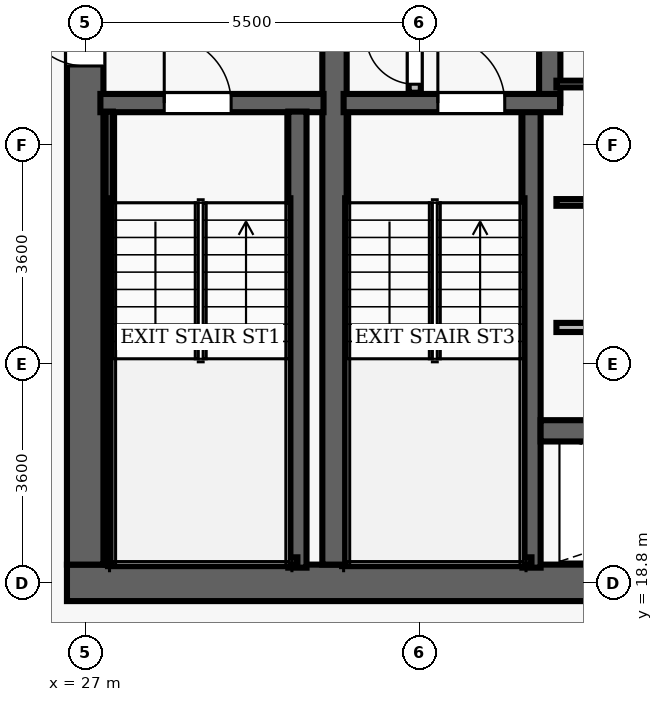
"""IFC4 building model, lengths in metres.
Left out: names, types, materials, properties, quantities, classifications, styles, units other than length and angle.
Written with IfcOpenShell. Run it as: python <this file> out.ifc"""

import sys

from ifc_helpers import new_model, si_unit, direction, frame, frame_2d, origin, place, context, subcontext, project, spatial, rectangle, extrude, element, fill, save


model = new_model("IFC4")
c1 = context("Model", 3, precision=1e-05, world=origin(), true_north=direction((0.0, 1.0)))
c2 = subcontext(c1, "Body", "Model", "MODEL_VIEW")
j1 = project(units=[si_unit("LENGTHUNIT", "METRE"), si_unit("PLANEANGLEUNIT", "RADIAN")], contexts=[c1])
p1 = place(None, origin())
s1 = spatial("IfcSite", under=j1, at=p1, CompositionType="ELEMENT")
p2 = place(p1, origin())
s2 = spatial("IfcBuilding", under=s1, at=p2, CompositionType="ELEMENT")
p3 = place(p2, frame((0.0, 0.0, 44.9)))
s3 = spatial("IfcBuildingStorey", under=s2, at=p3, CompositionType="ELEMENT", Elevation=44.9)
p4 = place(p3, frame((26.7, 18.8, 0.0), z_axis=(0.0, 0.0, 1.0), x_axis=(1.0, 0.0, 0.0)))
e1 = element("IfcWall", 1, at=p4, inside=s3, PredefinedType="SHEAR", context=c2, shape_type="SweptSolid", body=[
    extrude(rectangle(XDim=22.6, YDim=0.6, at=frame_2d((11.3, 0.0))), origin(), (0.0, 0.0, 1.0), 3.5),
])
p5 = place(p4, frame((14.52, 0.0, 0.0)))
e2 = element("IfcOpeningElement", 2, at=p5, cuts=e1, PredefinedType="OPENING", context=c2, shape_type="SweptSolid", body=[
    extrude(rectangle(XDim=1.05, YDim=2.15, at=frame_2d((0.525, 1.075))), frame((0.0, 0.31, 0.0), z_axis=(0.0, -1.0, 0.0), x_axis=(1.0, 0.0, 0.0)), (0.0, 0.0, 1.0), 0.62),
])
p6 = place(p3, frame((27.0, 19.1, 0.0), z_axis=(0.0, 0.0, 1.0), x_axis=(0.0, 1.0, 0.0)))
e3 = element("IfcWall", 3, at=p6, inside=s3, PredefinedType="SHEAR", context=c2, shape_type="SweptSolid", body=[
    extrude(rectangle(XDim=13.8, YDim=0.6, at=frame_2d((6.9, 0.0))), origin(), (0.0, 0.0, 1.0), 3.5),
])
p7 = place(p6, frame((8.2, 0.0, 0.0)))
e4 = element("IfcOpeningElement", 4, at=p7, cuts=e3, PredefinedType="OPENING", context=c2, shape_type="SweptSolid", body=[
    extrude(rectangle(XDim=1.05, YDim=2.15, at=frame_2d((0.525, 1.075))), frame((0.0, 0.31, 0.0), z_axis=(0.0, -1.0, 0.0), x_axis=(1.0, 0.0, 0.0)), (0.0, 0.0, 1.0), 0.62),
])
p8 = place(p3, frame((31.1, 19.1, 0.0), z_axis=(0.0, 0.0, 1.0), x_axis=(0.0, 1.0, 0.0)))
e5 = element("IfcWall", 5, at=p8, inside=s3, PredefinedType="SHEAR", context=c2, shape_type="SweptSolid", body=[
    extrude(rectangle(XDim=13.8, YDim=0.4, at=frame_2d((6.9, 0.0))), origin(), (0.0, 0.0, 1.0), 3.5),
])
p9 = place(p3, frame((27.25, 26.69, 0.0), z_axis=(0.0, 0.0, 1.0), x_axis=(1.0, 0.0, 0.0)))
e6 = element("IfcWall", 6, at=p9, inside=s3, PredefinedType="SHEAR", context=c2, shape_type="SweptSolid", body=[
    extrude(rectangle(XDim=3.67, YDim=0.3, at=frame_2d((1.835, 0.0))), origin(), (0.0, 0.0, 1.0), 3.5),
])
p10 = place(p9, frame((1.05, 0.0, 0.0)))
e7 = element("IfcOpeningElement", 7, at=p10, cuts=e6, PredefinedType="OPENING", context=c2, shape_type="SweptSolid", body=[
    extrude(rectangle(XDim=1.1, YDim=2.15, at=frame_2d((0.55, 1.075))), frame((0.0, 0.16, 0.0), z_axis=(0.0, -1.0, 0.0), x_axis=(1.0, 0.0, 0.0)), (0.0, 0.0, 1.0), 0.32),
])
p11 = place(p3, frame((30.49, 19.05, 0.0), z_axis=(0.0, 0.0, 1.0), x_axis=(0.0, 1.0, 0.0)))
e8 = element("IfcWall", 8, at=p11, inside=s3, PredefinedType="SHEAR", context=c2, shape_type="SweptSolid", body=[
    extrude(rectangle(XDim=7.5, YDim=0.3, at=frame_2d((3.75, 0.0))), origin(), (0.0, 0.0, 1.0), 3.5),
])
p12 = place(p3, frame((27.395, 19.1, 0.0), z_axis=(0.0, 0.0, 1.0), x_axis=(0.0, 1.0, 0.0)))
e9 = element("IfcWall", 9, at=p12, inside=s3, PredefinedType="SHEAR", context=c2, shape_type="SweptSolid", body=[
    extrude(rectangle(XDim=7.45, YDim=0.12, at=frame_2d((3.725, 0.0))), origin(), (0.0, 0.0, 1.0), 3.5),
])
p13 = place(p3, frame((27.395, 19.16, 0.0), z_axis=(0.0, 0.0, 1.0), x_axis=(1.0, 0.0, 0.0)))
e10 = element("IfcWall", 10, at=p13, inside=s3, PredefinedType="SHEAR", context=c2, shape_type="SweptSolid", body=[
    extrude(rectangle(XDim=3.095, YDim=0.12, at=frame_2d((1.547, 0.0))), origin(), (0.0, 0.0, 1.0), 3.5),
])
p14 = place(p3, frame((34.34, 19.05, 0.0), z_axis=(0.0, 0.0, 1.0), x_axis=(0.0, 1.0, 0.0)))
e11 = element("IfcWall", 11, at=p14, inside=s3, PredefinedType="SHEAR", context=c2, shape_type="SweptSolid", body=[
    extrude(rectangle(XDim=7.5, YDim=0.3, at=frame_2d((3.75, 0.0))), origin(), (0.0, 0.0, 1.0), 3.5),
])
p15 = place(p3, frame((34.64, 26.69, 0.0), z_axis=(0.0, 0.0, 1.0), x_axis=(0.0, 1.0, 0.0)))
e12 = element("IfcWall", 12, at=p15, inside=s3, PredefinedType="SHEAR", context=c2, shape_type="SweptSolid", body=[
    extrude(rectangle(XDim=6.26, YDim=0.35, at=frame_2d((3.13, 0.0))), origin(), (0.0, 0.0, 1.0), 3.5),
])
p16 = place(p3, frame((31.25, 26.69, 0.0), z_axis=(0.0, 0.0, 1.0), x_axis=(1.0, 0.0, 0.0)))
e13 = element("IfcWall", 13, at=p16, inside=s3, PredefinedType="SHEAR", context=c2, shape_type="SweptSolid", body=[
    extrude(rectangle(XDim=3.56, YDim=0.3, at=frame_2d((1.78, 0.0))), origin(), (0.0, 0.0, 1.0), 3.5),
])
p17 = place(p16, frame((1.55, 0.0, 0.0)))
e14 = element("IfcOpeningElement", 14, at=p17, cuts=e13, PredefinedType="OPENING", context=c2, shape_type="SweptSolid", body=[
    extrude(rectangle(XDim=1.1, YDim=2.15, at=frame_2d((0.55, 1.075))), frame((0.0, 0.16, 0.0), z_axis=(0.0, -1.0, 0.0), x_axis=(1.0, 0.0, 0.0)), (0.0, 0.0, 1.0), 0.32),
])
p18 = place(p3, frame((31.3, 19.16, 0.0), z_axis=(0.0, 0.0, 1.0), x_axis=(1.0, 0.0, 0.0)))
e15 = element("IfcWall", 15, at=p18, inside=s3, PredefinedType="SHEAR", context=c2, shape_type="SweptSolid", body=[
    extrude(rectangle(XDim=3.04, YDim=0.12, at=frame_2d((1.52, 0.0))), origin(), (0.0, 0.0, 1.0), 3.5),
])
p19 = place(p3, frame((32.42, 26.86, 0.0), z_axis=(0.0, 0.0, 1.0), x_axis=(0.0, 1.0, 0.0)))
e16 = element("IfcWall", 16, at=p19, inside=s3, PredefinedType="PARTITIONING", context=c2, shape_type="SweptSolid", body=[
    extrude(rectangle(XDim=2.04, YDim=0.2, at=frame_2d((1.02, 0.0))), origin(), (0.0, 0.0, 1.0), 2.6),
])
p20 = place(p19, frame((0.14, 0.0, 0.0)))
e17 = element("IfcOpeningElement", 17, at=p20, cuts=e16, PredefinedType="OPENING", context=c2, shape_type="SweptSolid", body=[
    extrude(rectangle(XDim=0.8, YDim=2.05, at=frame_2d((0.4, 1.025))), frame((0.0, 0.11, 0.0), z_axis=(0.0, -1.0, 0.0), x_axis=(1.0, 0.0, 0.0)), (0.0, 0.0, 1.0), 0.22),
])
p21 = place(p3, frame((34.49, 21.3, 0.0), z_axis=(0.0, 0.0, 1.0), x_axis=(1.0, 0.0, 0.0)))
e18 = element("IfcWall", 18, at=p21, inside=s3, PredefinedType="SHEAR", context=c2, shape_type="SweptSolid", body=[
    extrude(rectangle(XDim=6.68, YDim=0.35, at=frame_2d((3.34, 0.0))), origin(), (0.0, 0.0, 1.0), 2.6),
])
p22 = place(p3, frame((34.75, 23.0, 0.0), z_axis=(0.0, 0.0, 1.0), x_axis=(1.0, 0.0, 0.0)))
e19 = element("IfcWall", 19, at=p22, inside=s3, PredefinedType="PARTITIONING", context=c2, shape_type="SweptSolid", body=[
    extrude(rectangle(XDim=6.25, YDim=0.15, at=frame_2d((3.125, 0.0))), origin(), (0.0, 0.0, 1.0), 2.6),
])
for number, where, z_axis, x_axis in (
    (20, (34.75, 25.056, 0.0), (0.0, 0.0, 1.0), (1.0, 0.0, 0.0)),
    (21, (34.75, 27.003, 0.0), (0.0, 0.0, 1.0), (1.0, 0.0, 0.0)),
):
    element("IfcWall", number, at=place(p3, frame(where, z_axis=z_axis, x_axis=x_axis)), inside=s3, PredefinedType="PARTITIONING", context=c2, shape_type="SweptSolid", body=[
        extrude(rectangle(XDim=6.25, YDim=0.11, at=frame_2d((3.125, 0.0))), origin(), (0.0, 0.0, 1.0), 2.6),
    ])
p23 = place(p10, origin())
e22 = element("IfcDoor", 22, at=p23, inside=s3, OperationType="SINGLE_SWING_LEFT", PredefinedType="DOOR", context=c2, shape_type="SweptSolid", body=[
    extrude(rectangle(XDim=1.1, YDim=2.15, at=frame_2d((0.55, 1.075))), frame((0.0, 0.025, 0.0), z_axis=(0.0, -1.0, 0.0), x_axis=(1.0, 0.0, 0.0)), (0.0, 0.0, 1.0), 0.05),
])
fill(e7, e22)
p24 = place(p7, origin())
e23 = element("IfcDoor", 23, at=p24, inside=s3, OperationType="SINGLE_SWING_RIGHT", PredefinedType="DOOR", context=c2, shape_type="SweptSolid", body=[
    extrude(rectangle(XDim=1.05, YDim=2.15, at=frame_2d((0.525, 1.075))), frame((0.0, 0.025, 0.0), z_axis=(0.0, -1.0, 0.0), x_axis=(1.0, 0.0, 0.0)), (0.0, 0.0, 1.0), 0.05),
])
fill(e4, e23)
p25 = place(p17, origin())
e24 = element("IfcDoor", 24, at=p25, inside=s3, OperationType="SINGLE_SWING_LEFT", PredefinedType="DOOR", context=c2, shape_type="SweptSolid", body=[
    extrude(rectangle(XDim=1.1, YDim=2.15, at=frame_2d((0.55, 1.075))), frame((0.0, 0.025, 0.0), z_axis=(0.0, -1.0, 0.0), x_axis=(1.0, 0.0, 0.0)), (0.0, 0.0, 1.0), 0.05),
])
fill(e14, e24)
p26 = place(p20, origin())
e25 = element("IfcDoor", 25, at=p26, inside=s3, OperationType="SINGLE_SWING_RIGHT", PredefinedType="DOOR", context=c2, shape_type="SweptSolid", body=[
    extrude(rectangle(XDim=0.8, YDim=2.05, at=frame_2d((0.4, 1.025))), frame((0.0, 0.025, 0.0), z_axis=(0.0, -1.0, 0.0), x_axis=(1.0, 0.0, 0.0)), (0.0, 0.0, 1.0), 0.05),
])
fill(e17, e25)
save(model, sys.argv[1])
